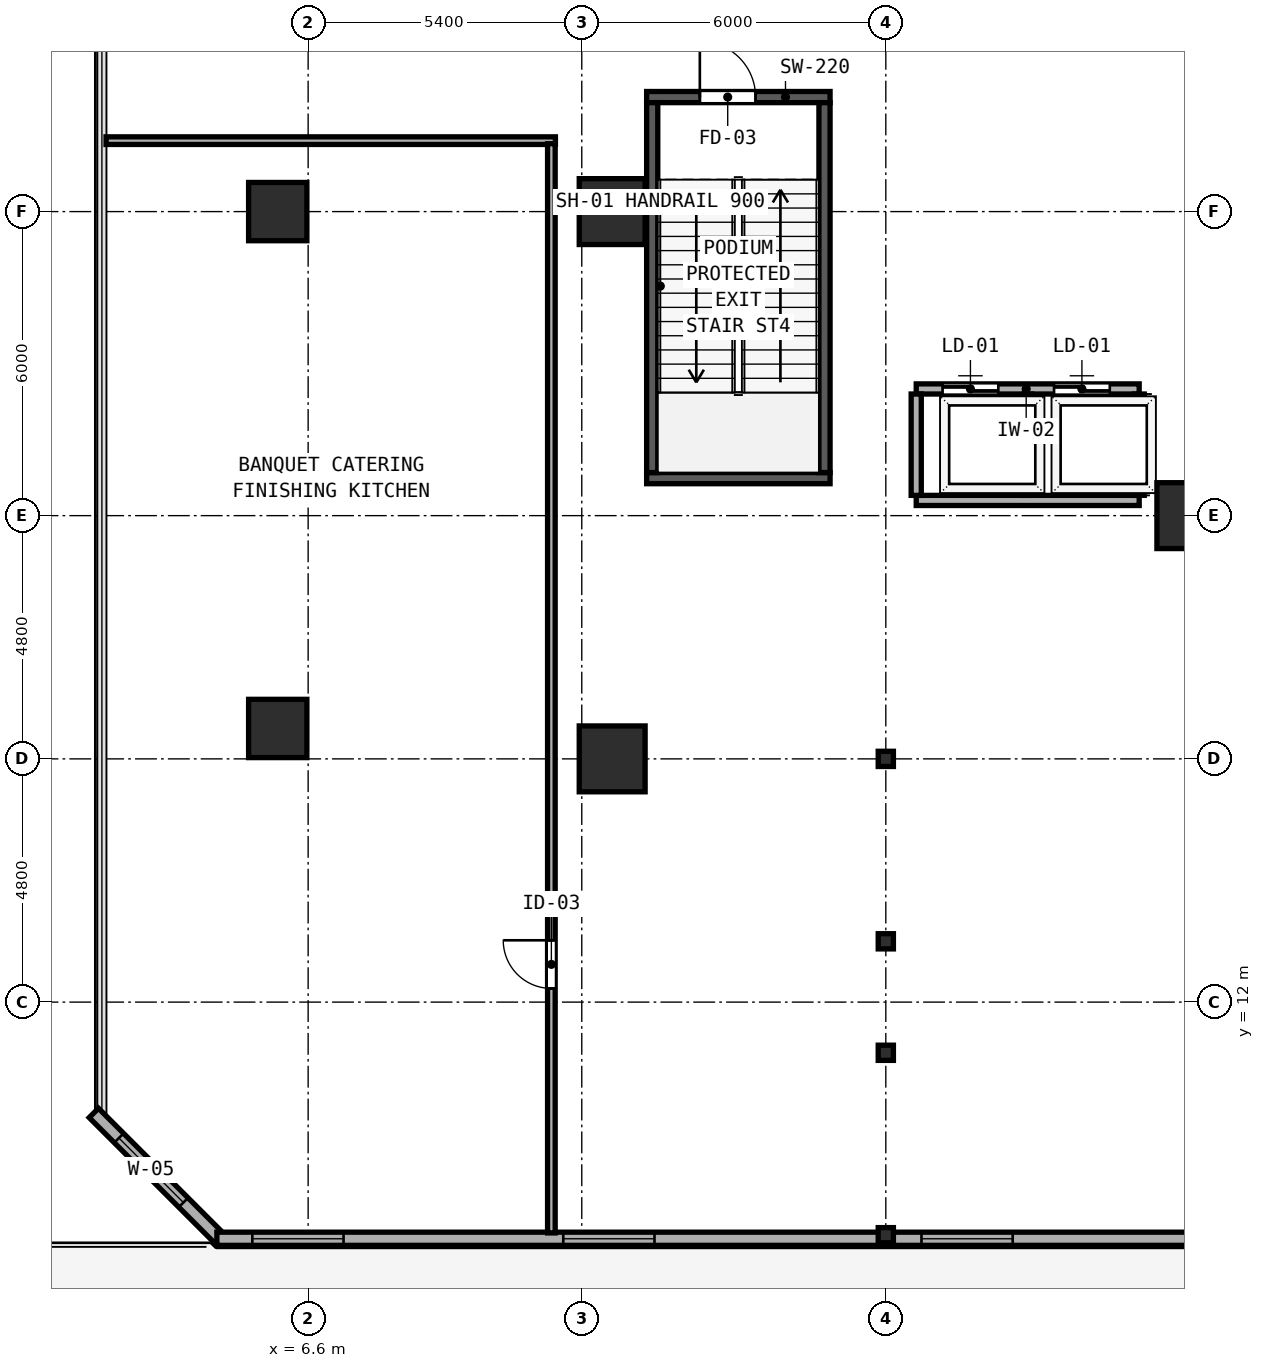
"""IFC4 building model, lengths in metres.
Left out: names, types, materials, properties, quantities, classifications, styles, units other than length and angle.
Written with IfcOpenShell. Run it as: python <this file> out.ifc"""

import sys

from ifc_helpers import new_model, si_unit, direction, frame, frame_2d, origin, origin_2d, place, context, subcontext, project, spatial, rectangle, hollow_rectangle, i_section, extrude, element, fill, save


model = new_model("IFC4")
c1 = context("Model", 3, precision=1e-05, world=origin(), true_north=direction((0.0, 1.0)))
c2 = subcontext(c1, "Body", "Model", "MODEL_VIEW")
j1 = project(units=[si_unit("LENGTHUNIT", "METRE"), si_unit("PLANEANGLEUNIT", "RADIAN")], contexts=[c1])
p1 = place(None, origin())
s1 = spatial("IfcSite", under=j1, at=p1, CompositionType="ELEMENT")
p2 = place(p1, origin())
s2 = spatial("IfcBuilding", under=s1, at=p2, CompositionType="ELEMENT")
p3 = place(p2, frame((0.0, 0.0, 10.2)))
s3 = spatial("IfcBuildingStorey", under=s2, at=p3, CompositionType="ELEMENT", Elevation=10.2)
p4 = place(p3, frame((13.28, 29.86, 0.0), z_axis=(0.0, 0.0, 1.0), x_axis=(1.0, 0.0, 0.0)))
e1 = element("IfcWall", 1, at=p4, inside=s3, PredefinedType="SHEAR", context=c2, shape_type="SweptSolid", body=[
    extrude(rectangle(XDim=3.62, YDim=0.22, at=frame_2d((1.81, 0.0))), origin(), (0.0, 0.0, 1.0), 5.16),
])
p5 = place(p4, frame((1.05, 0.0, 0.0)))
e2 = element("IfcOpeningElement", 2, at=p5, cuts=e1, PredefinedType="OPENING", context=c2, shape_type="SweptSolid", body=[
    extrude(rectangle(XDim=1.1, YDim=2.15, at=frame_2d((0.55, 1.075))), frame((0.0, 0.12, 0.0), z_axis=(0.0, -1.0, 0.0), x_axis=(1.0, 0.0, 0.0)), (0.0, 0.0, 1.0), 0.24),
])
p6 = place(p3, frame((13.28, 22.34, 0.0), z_axis=(0.0, 0.0, 1.0), x_axis=(1.0, 0.0, 0.0)))
e3 = element("IfcWall", 3, at=p6, inside=s3, PredefinedType="SHEAR", context=c2, shape_type="SweptSolid", body=[
    extrude(rectangle(XDim=3.62, YDim=0.22, at=frame_2d((1.81, 0.0))), origin(), (0.0, 0.0, 1.0), 5.16),
])
for number, where, z_axis, x_axis in (
    (4, (13.39, 22.45, 0.0), (0.0, 0.0, 1.0), (0.0, 1.0, 0.0)),
    (5, (16.79, 22.45, 0.0), (0.0, 0.0, 1.0), (0.0, 1.0, 0.0)),
):
    element("IfcWall", number, at=place(p3, frame(where, z_axis=z_axis, x_axis=x_axis)), inside=s3, PredefinedType="SHEAR", context=c2, shape_type="SweptSolid", body=[
        extrude(rectangle(XDim=7.3, YDim=0.22, at=frame_2d((3.65, 0.0))), origin(), (0.0, 0.0, 1.0), 5.16),
    ])
for number, where, z_axis, x_axis in (
    (6, (24.0, 21.6, 0.0), (0.0, 0.0, 1.0), (1.0, 0.0, 0.0)),
    (7, (12.6, 16.8, 0.0), (0.0, 0.0, 1.0), (1.0, 0.0, 0.0)),
    (8, (12.6, 27.6, 0.0), (0.0, 0.0, 1.0), (1.0, 0.0, 0.0)),
):
    element("IfcColumn", number, at=place(p3, frame(where, z_axis=z_axis, x_axis=x_axis)), inside=s3, PredefinedType="COLUMN", context=c2, shape_type="SweptSolid", body=[
        extrude(hollow_rectangle(XDim=1.3, YDim=1.3, WallThickness=0.048, at=origin_2d()), origin(), (0.0, 0.0, 1.0), 5.4),
    ])
for number, where, z_axis, x_axis in (
    (9, (6.0, 17.4, 0.0), (0.0, 0.0, 1.0), (1.0, 0.0, 0.0)),
    (10, (6.0, 27.6, 0.0), (0.0, 0.0, 1.0), (1.0, 0.0, 0.0)),
):
    element("IfcColumn", number, at=place(p3, frame(where, z_axis=z_axis, x_axis=x_axis)), inside=s3, PredefinedType="COLUMN", context=c2, shape_type="SweptSolid", body=[
        extrude(hollow_rectangle(XDim=1.15, YDim=1.15, WallThickness=0.042, at=origin_2d()), origin(), (0.0, 0.0, 1.0), 5.4),
    ])
for number, where, z_axis, x_axis in (
    (11, (18.0, 7.4, 0.0), (0.0, 0.0, 1.0), (1.0, 0.0, 0.0)),
    (12, (18.0, 11.0, 0.0), (0.0, 0.0, 1.0), (1.0, 0.0, 0.0)),
    (13, (18.0, 13.2, 0.0), (0.0, 0.0, 1.0), (1.0, 0.0, 0.0)),
    (14, (18.0, 16.8, 0.0), (0.0, 0.0, 1.0), (1.0, 0.0, 0.0)),
):
    element("IfcColumn", number, at=place(p3, frame(where, z_axis=z_axis, x_axis=x_axis)), inside=s3, PredefinedType="COLUMN", context=c2, shape_type="SweptSolid", body=[
        extrude(i_section(OverallWidth=0.3, OverallDepth=0.3, WebThickness=0.01, FlangeThickness=0.015, FilletRadius=0.018, at=origin_2d()), origin(), (0.0, 0.0, 1.0), 5.4),
    ])
p7 = place(p3, frame((2.371, 9.813, 0.0), z_axis=(0.0, 0.0, 1.0), x_axis=(0.707072552817, -0.7071410079, 0.0)))
e15 = element("IfcWall", 15, at=p7, inside=s3, PredefinedType="SOLIDWALL", context=c2, shape_type="SweptSolid", body=[
    extrude(rectangle(XDim=3.566, YDim=0.26, at=frame_2d((1.783, 0.0))), origin(), (0.0, 0.0, 1.0), 5.16),
])
p8 = place(p7, frame((0.7, 0.0, 0.85)))
e16 = element("IfcOpeningElement", 16, at=p8, cuts=e15, PredefinedType="OPENING", context=c2, shape_type="SweptSolid", body=[
    extrude(rectangle(XDim=1.8, YDim=2.2, at=frame_2d((0.9, 1.1))), frame((0.0, 0.14, 0.0), z_axis=(0.0, -1.0, 0.0), x_axis=(1.0, 0.0, 0.0)), (0.0, 0.0, 1.0), 0.28),
])
p9 = place(p3, frame((4.799, 7.33, 0.0), z_axis=(0.0, 0.0, 1.0), x_axis=(1.0, 0.0, 0.0)))
e17 = element("IfcWall", 17, at=p9, inside=s3, PredefinedType="SOLIDWALL", context=c2, shape_type="SweptSolid", body=[
    extrude(rectangle(XDim=13.197, YDim=0.26, at=frame_2d((6.599, 0.0))), origin(), (0.0, 0.0, 1.0), 5.16),
])
p10 = place(p9, frame((0.7, 0.0, 0.85)))
e18 = element("IfcOpeningElement", 18, at=p10, cuts=e17, PredefinedType="OPENING", context=c2, shape_type="SweptSolid", body=[
    extrude(rectangle(XDim=1.8, YDim=2.2, at=frame_2d((0.9, 1.1))), frame((0.0, 0.14, 0.0), z_axis=(0.0, -1.0, 0.0), x_axis=(1.0, 0.0, 0.0)), (0.0, 0.0, 1.0), 0.28),
])
p11 = place(p9, frame((6.836, 0.0, 0.85)))
e19 = element("IfcOpeningElement", 19, at=p11, cuts=e17, PredefinedType="OPENING", context=c2, shape_type="SweptSolid", body=[
    extrude(rectangle(XDim=1.8, YDim=2.2, at=frame_2d((0.9, 1.1))), frame((0.0, 0.14, 0.0), z_axis=(0.0, -1.0, 0.0), x_axis=(1.0, 0.0, 0.0)), (0.0, 0.0, 1.0), 0.28),
])
p12 = place(p3, frame((18.004, 7.33, 0.0), z_axis=(0.0, 0.0, 1.0), x_axis=(1.0, 0.0, 0.0)))
e20 = element("IfcWall", 20, at=p12, inside=s3, PredefinedType="SOLIDWALL", context=c2, shape_type="SweptSolid", body=[
    extrude(rectangle(XDim=40.792, YDim=0.26, at=frame_2d((20.396, 0.0))), origin(), (0.0, 0.0, 1.0), 5.16),
])
p13 = place(p12, frame((0.7, 0.0, 0.85)))
e21 = element("IfcOpeningElement", 21, at=p13, cuts=e20, PredefinedType="OPENING", context=c2, shape_type="SweptSolid", body=[
    extrude(rectangle(XDim=1.8, YDim=2.2, at=frame_2d((0.9, 1.1))), frame((0.0, 0.14, 0.0), z_axis=(0.0, -1.0, 0.0), x_axis=(1.0, 0.0, 0.0)), (0.0, 0.0, 1.0), 0.28),
])
p14 = place(p12, frame((6.1, 0.0, 0.85)))
e22 = element("IfcOpeningElement", 22, at=p14, cuts=e20, PredefinedType="OPENING", context=c2, shape_type="SweptSolid", body=[
    extrude(rectangle(XDim=1.8, YDim=2.2, at=frame_2d((0.9, 1.1))), frame((0.0, 0.14, 0.0), z_axis=(0.0, -1.0, 0.0), x_axis=(1.0, 0.0, 0.0)), (0.0, 0.0, 1.0), 0.28),
])
p15 = place(p12, frame((11.5, 0.0, 0.85)))
e23 = element("IfcOpeningElement", 23, at=p15, cuts=e20, PredefinedType="OPENING", context=c2, shape_type="SweptSolid", body=[
    extrude(rectangle(XDim=1.8, YDim=2.2, at=frame_2d((0.9, 1.1))), frame((0.0, 0.14, 0.0), z_axis=(0.0, -1.0, 0.0), x_axis=(1.0, 0.0, 0.0)), (0.0, 0.0, 1.0), 0.28),
])
p16 = place(p12, frame((16.9, 0.0, 0.85)))
e24 = element("IfcOpeningElement", 24, at=p16, cuts=e20, PredefinedType="OPENING", context=c2, shape_type="SweptSolid", body=[
    extrude(rectangle(XDim=1.8, YDim=2.2, at=frame_2d((0.9, 1.1))), frame((0.0, 0.14, 0.0), z_axis=(0.0, -1.0, 0.0), x_axis=(1.0, 0.0, 0.0)), (0.0, 0.0, 1.0), 0.28),
])
p17 = place(p12, frame((22.3, 0.0, 0.85)))
e25 = element("IfcOpeningElement", 25, at=p17, cuts=e20, PredefinedType="OPENING", context=c2, shape_type="SweptSolid", body=[
    extrude(rectangle(XDim=1.8, YDim=2.2, at=frame_2d((0.9, 1.1))), frame((0.0, 0.14, 0.0), z_axis=(0.0, -1.0, 0.0), x_axis=(1.0, 0.0, 0.0)), (0.0, 0.0, 1.0), 0.28),
])
p18 = place(p12, frame((27.7, 0.0, 0.85)))
e26 = element("IfcOpeningElement", 26, at=p18, cuts=e20, PredefinedType="OPENING", context=c2, shape_type="SweptSolid", body=[
    extrude(rectangle(XDim=1.8, YDim=2.2, at=frame_2d((0.9, 1.1))), frame((0.0, 0.14, 0.0), z_axis=(0.0, -1.0, 0.0), x_axis=(1.0, 0.0, 0.0)), (0.0, 0.0, 1.0), 0.28),
])
p19 = place(p12, frame((33.1, 0.0, 0.85)))
e27 = element("IfcOpeningElement", 27, at=p19, cuts=e20, PredefinedType="OPENING", context=c2, shape_type="SweptSolid", body=[
    extrude(rectangle(XDim=1.8, YDim=2.2, at=frame_2d((0.9, 1.1))), frame((0.0, 0.14, 0.0), z_axis=(0.0, -1.0, 0.0), x_axis=(1.0, 0.0, 0.0)), (0.0, 0.0, 1.0), 0.28),
])
p20 = place(p3, frame((18.6, 24.1, 0.0), z_axis=(0.0, 0.0, 1.0), x_axis=(1.0, 0.0, 0.0)))
e28 = element("IfcWall", 28, at=p20, inside=s3, PredefinedType="SOLIDWALL", context=c2, shape_type="SweptSolid", body=[
    extrude(rectangle(XDim=4.4, YDim=0.2, at=frame_2d((2.2, 0.0))), origin(), (0.0, 0.0, 1.0), 5.16),
])
p21 = place(p20, frame((0.52, 0.0, 0.0)))
e29 = element("IfcOpeningElement", 29, at=p21, cuts=e28, PredefinedType="OPENING", context=c2, shape_type="SweptSolid", body=[
    extrude(rectangle(XDim=1.1, YDim=2.2, at=frame_2d((0.55, 1.1))), frame((0.0, 0.11, 0.0), z_axis=(0.0, -1.0, 0.0), x_axis=(1.0, 0.0, 0.0)), (0.0, 0.0, 1.0), 0.22),
])
p22 = place(p20, frame((2.72, 0.0, 0.0)))
e30 = element("IfcOpeningElement", 30, at=p22, cuts=e28, PredefinedType="OPENING", context=c2, shape_type="SweptSolid", body=[
    extrude(rectangle(XDim=1.1, YDim=2.2, at=frame_2d((0.55, 1.1))), frame((0.0, 0.11, 0.0), z_axis=(0.0, -1.0, 0.0), x_axis=(1.0, 0.0, 0.0)), (0.0, 0.0, 1.0), 0.22),
])
p23 = place(p3, frame((18.6, 21.9, 0.0), z_axis=(0.0, 0.0, 1.0), x_axis=(1.0, 0.0, 0.0)))
e31 = element("IfcWall", 31, at=p23, inside=s3, PredefinedType="SOLIDWALL", context=c2, shape_type="SweptSolid", body=[
    extrude(rectangle(XDim=4.4, YDim=0.2, at=frame_2d((2.2, 0.0))), origin(), (0.0, 0.0, 1.0), 5.16),
])
for number, where, z_axis, x_axis in (
    (32, (18.6, 22.0, 0.0), (0.0, 0.0, 1.0), (0.0, 1.0, 0.0)),
    (33, (23.0, 22.0, 0.0), (0.0, 0.0, 1.0), (0.0, 1.0, 0.0)),
):
    element("IfcWall", number, at=place(p3, frame(where, z_axis=z_axis, x_axis=x_axis)), inside=s3, PredefinedType="SOLIDWALL", context=c2, shape_type="SweptSolid", body=[
        extrude(rectangle(XDim=2.0, YDim=0.2, at=frame_2d((1.0, 0.0))), origin(), (0.0, 0.0, 1.0), 5.16),
    ])
p24 = place(p3, frame((20.8, 22.0, 0.0), z_axis=(0.0, 0.0, 1.0), x_axis=(0.0, 1.0, 0.0)))
e34 = element("IfcWall", 34, at=p24, inside=s3, PredefinedType="SOLIDWALL", context=c2, shape_type="SweptSolid", body=[
    extrude(rectangle(XDim=2.0, YDim=0.16, at=frame_2d((1.0, 0.0))), origin(), (0.0, 0.0, 1.0), 5.16),
])
p25 = place(p3, frame((2.612, 29.0, 0.0), z_axis=(0.0, 0.0, 1.0), x_axis=(1.0, 0.0, 0.0)))
e35 = element("IfcWall", 35, at=p25, inside=s3, PredefinedType="PARTITIONING", context=c2, shape_type="SweptSolid", body=[
    extrude(rectangle(XDim=8.868, YDim=0.15, at=frame_2d((4.434, 0.0))), origin(), (0.0, 0.0, 1.0), 5.16),
])
p26 = place(p3, frame((11.4, 7.445, 0.0), z_axis=(0.0, 0.0, 1.0), x_axis=(0.0, 1.0, 0.0)))
e36 = element("IfcWall", 36, at=p26, inside=s3, PredefinedType="PARTITIONING", context=c2, shape_type="SweptSolid", body=[
    extrude(rectangle(XDim=21.495, YDim=0.15, at=frame_2d((10.748, 0.0))), origin(), (0.0, 0.0, 1.0), 5.16),
])
p27 = place(p26, frame((5.775, 0.0, 0.0), z_axis=(0.0, 0.0, 1.0), x_axis=(-1.0, 0.0, 0.0)))
e37 = element("IfcOpeningElement", 37, at=p27, cuts=e36, PredefinedType="OPENING", context=c2, shape_type="SweptSolid", body=[
    extrude(rectangle(XDim=0.95, YDim=2.12, at=frame_2d((0.475, 1.06))), frame((0.0, 0.085, 0.0), z_axis=(0.0, -1.0, 0.0), x_axis=(1.0, 0.0, 0.0)), (0.0, 0.0, 1.0), 0.17),
])
p28 = place(p8, origin())
e38 = element("IfcWindow", 38, at=p28, inside=s3, PartitioningType="SINGLE_PANEL", PredefinedType="WINDOW", context=c2, shape_type="SweptSolid", body=[
    extrude(rectangle(XDim=1.8, YDim=2.2, at=frame_2d((0.9, 1.1))), frame((0.0, 0.03, 0.0), z_axis=(0.0, -1.0, 0.0), x_axis=(1.0, 0.0, 0.0)), (0.0, 0.0, 1.0), 0.06),
])
fill(e16, e38)
p29 = place(p10, origin())
e39 = element("IfcWindow", 39, at=p29, inside=s3, PartitioningType="SINGLE_PANEL", PredefinedType="WINDOW", context=c2, shape_type="SweptSolid", body=[
    extrude(rectangle(XDim=1.8, YDim=2.2, at=frame_2d((0.9, 1.1))), frame((0.0, 0.03, 0.0), z_axis=(0.0, -1.0, 0.0), x_axis=(1.0, 0.0, 0.0)), (0.0, 0.0, 1.0), 0.06),
])
fill(e18, e39)
p30 = place(p11, origin())
e40 = element("IfcWindow", 40, at=p30, inside=s3, PartitioningType="SINGLE_PANEL", PredefinedType="WINDOW", context=c2, shape_type="SweptSolid", body=[
    extrude(rectangle(XDim=1.8, YDim=2.2, at=frame_2d((0.9, 1.1))), frame((0.0, 0.03, 0.0), z_axis=(0.0, -1.0, 0.0), x_axis=(1.0, 0.0, 0.0)), (0.0, 0.0, 1.0), 0.06),
])
fill(e19, e40)
p31 = place(p13, origin())
e41 = element("IfcWindow", 41, at=p31, inside=s3, PartitioningType="SINGLE_PANEL", PredefinedType="WINDOW", context=c2, shape_type="SweptSolid", body=[
    extrude(rectangle(XDim=1.8, YDim=2.2, at=frame_2d((0.9, 1.1))), frame((0.0, 0.03, 0.0), z_axis=(0.0, -1.0, 0.0), x_axis=(1.0, 0.0, 0.0)), (0.0, 0.0, 1.0), 0.06),
])
fill(e21, e41)
p32 = place(p5, origin())
e42 = element("IfcDoor", 42, at=p32, inside=s3, OperationType="SINGLE_SWING_LEFT", PredefinedType="DOOR", context=c2, shape_type="SweptSolid", body=[
    extrude(rectangle(XDim=1.1, YDim=2.15, at=frame_2d((0.55, 1.075))), frame((0.0, 0.025, 0.0), z_axis=(0.0, -1.0, 0.0), x_axis=(1.0, 0.0, 0.0)), (0.0, 0.0, 1.0), 0.05),
])
fill(e2, e42)
p33 = place(p21, origin())
e43 = element("IfcDoor", 43, at=p33, inside=s3, OperationType="SLIDING_TO_LEFT", PredefinedType="DOOR", context=c2, shape_type="SweptSolid", body=[
    extrude(rectangle(XDim=1.1, YDim=2.2, at=frame_2d((0.55, 1.1))), frame((0.0, 0.025, 0.0), z_axis=(0.0, -1.0, 0.0), x_axis=(1.0, 0.0, 0.0)), (0.0, 0.0, 1.0), 0.05),
])
fill(e29, e43)
p34 = place(p22, origin())
e44 = element("IfcDoor", 44, at=p34, inside=s3, OperationType="SLIDING_TO_LEFT", PredefinedType="DOOR", context=c2, shape_type="SweptSolid", body=[
    extrude(rectangle(XDim=1.1, YDim=2.2, at=frame_2d((0.55, 1.1))), frame((0.0, 0.025, 0.0), z_axis=(0.0, -1.0, 0.0), x_axis=(1.0, 0.0, 0.0)), (0.0, 0.0, 1.0), 0.05),
])
fill(e30, e44)
p35 = place(p27, origin())
e45 = element("IfcDoor", 45, at=p35, inside=s3, OperationType="SINGLE_SWING_LEFT", PredefinedType="DOOR", context=c2, shape_type="SweptSolid", body=[
    extrude(rectangle(XDim=0.95, YDim=2.12, at=frame_2d((0.475, 1.06))), frame((0.0, 0.025, 0.0), z_axis=(0.0, -1.0, 0.0), x_axis=(1.0, 0.0, 0.0)), (0.0, 0.0, 1.0), 0.05),
])
fill(e37, e45)
save(model, sys.argv[1])
